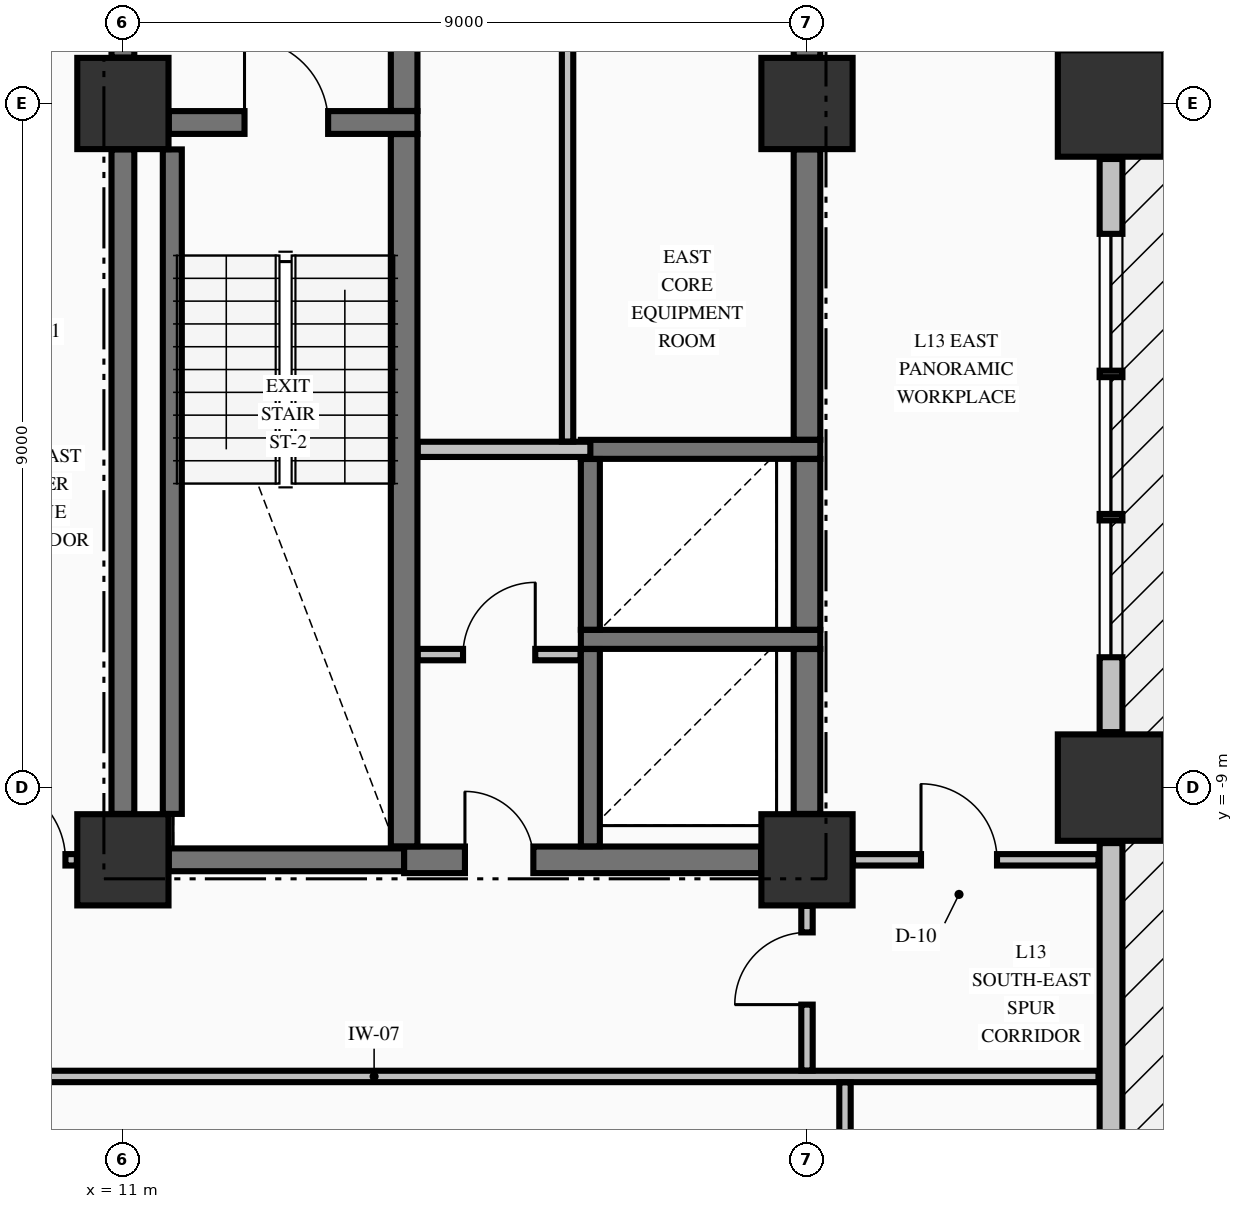
"""IFC4 building model, lengths in metres.
Left out: names, types, materials, properties, quantities, classifications, styles, units other than length and angle.
Written with IfcOpenShell. Run it as: python <this file> out.ifc"""

import sys

from ifc_helpers import new_model, si_unit, direction, frame, frame_2d, origin, origin_2d, place, context, subcontext, project, spatial, rectangle, extrude, element, fill, save


model = new_model("IFC4")
c1 = context("Model", 3, precision=1e-05, world=origin(), true_north=direction((0.0, 1.0)))
c2 = subcontext(c1, "Body", "Model", "MODEL_VIEW")
j1 = project(units=[si_unit("LENGTHUNIT", "METRE"), si_unit("PLANEANGLEUNIT", "RADIAN")], contexts=[c1])
p1 = place(None, origin())
s1 = spatial("IfcSite", under=j1, at=p1, CompositionType="ELEMENT")
p2 = place(p1, origin())
s2 = spatial("IfcBuilding", under=s1, at=p2, CompositionType="ELEMENT")
p3 = place(p2, frame((0.0, 0.0, 57.19)))
s3 = spatial("IfcBuildingStorey", under=s2, at=p3, CompositionType="ELEMENT", Elevation=57.19)
for number, where, z_axis, x_axis in (
    (1, (24.0, -9.0, -0.425), (0.0, 0.0, 1.0), (1.0, 0.0, 0.0)),
    (2, (24.0, 0.0, -0.425), (0.0, 0.0, 1.0), (1.0, 0.0, 0.0)),
):
    element("IfcColumn", number, at=place(p3, frame(where, z_axis=z_axis, x_axis=x_axis)), inside=s3, PredefinedType="COLUMN", context=c2, shape_type="SweptSolid", body=[
        extrude(rectangle(XDim=1.4, YDim=1.4, at=origin_2d()), origin(), (0.0, 0.0, 1.0), 3.695),
    ])
for number, where, z_axis, x_axis in (
    (3, (11.0, -9.95, -0.425), (0.0, 0.0, 1.0), (1.0, 0.0, 0.0)),
    (4, (11.0, 0.0, -0.425), (0.0, 0.0, 1.0), (1.0, 0.0, 0.0)),
    (5, (20.0, -9.95, -0.425), (0.0, 0.0, 1.0), (1.0, 0.0, 0.0)),
    (6, (20.0, 0.0, -0.425), (0.0, 0.0, 1.0), (1.0, 0.0, 0.0)),
):
    element("IfcColumn", number, at=place(p3, frame(where, z_axis=z_axis, x_axis=x_axis)), inside=s3, PredefinedType="COLUMN", context=c2, shape_type="SweptSolid", body=[
        extrude(rectangle(XDim=1.2, YDim=1.2, at=origin_2d()), origin(), (0.0, 0.0, 1.0), 3.695),
    ])
p4 = place(p3, frame((24.0, -22.27, 0.0), z_axis=(0.0, 0.0, 1.0), x_axis=(0.0, 1.0, 0.0)))
e7 = element("IfcWall", 7, at=p4, inside=s3, PredefinedType="STANDARD", context=c2, shape_type="SweptSolid", body=[
    extrude(rectangle(XDim=12.54, YDim=0.3, at=frame_2d((6.27, 0.0))), origin(), (0.0, 0.0, 1.0), 2.662),
])
p5 = place(p3, frame((24.0, -8.27, 0.0), z_axis=(0.0, 0.0, 1.0), x_axis=(0.0, 1.0, 0.0)))
e8 = element("IfcWall", 8, at=p5, inside=s3, PredefinedType="STANDARD", context=c2, shape_type="SweptSolid", body=[
    extrude(rectangle(XDim=7.54, YDim=0.3, at=frame_2d((3.77, 0.0))), origin(), (0.0, 0.0, 1.0), 2.662),
])
p6 = place(p5, frame((0.985, 0.0, 0.78)))
e9 = element("IfcOpeningElement", 9, at=p6, cuts=e8, PredefinedType="OPENING", context=c2, shape_type="SweptSolid", body=[
    extrude(rectangle(XDim=1.8, YDim=1.72, at=frame_2d((0.9, 0.86))), frame((0.0, 0.16, 0.0), z_axis=(0.0, -1.0, 0.0), x_axis=(1.0, 0.0, 0.0)), (0.0, 0.0, 1.0), 0.32),
])
p7 = place(p5, frame((2.87, 0.0, 0.78)))
e10 = element("IfcOpeningElement", 10, at=p7, cuts=e8, PredefinedType="OPENING", context=c2, shape_type="SweptSolid", body=[
    extrude(rectangle(XDim=1.8, YDim=1.72, at=frame_2d((0.9, 0.86))), frame((0.0, 0.16, 0.0), z_axis=(0.0, -1.0, 0.0), x_axis=(1.0, 0.0, 0.0)), (0.0, 0.0, 1.0), 0.32),
])
p8 = place(p5, frame((4.755, 0.0, 0.78)))
e11 = element("IfcOpeningElement", 11, at=p8, cuts=e8, PredefinedType="OPENING", context=c2, shape_type="SweptSolid", body=[
    extrude(rectangle(XDim=1.8, YDim=1.72, at=frame_2d((0.9, 0.86))), frame((0.0, 0.16, 0.0), z_axis=(0.0, -1.0, 0.0), x_axis=(1.0, 0.0, 0.0)), (0.0, 0.0, 1.0), 0.32),
])
p9 = place(p3, frame((11.604, -9.95, 0.0), z_axis=(0.0, 0.0, 1.0), x_axis=(1.0, 0.0, 0.0)))
e12 = element("IfcWall", 12, at=p9, inside=s3, PredefinedType="SHEAR", context=c2, shape_type="SweptSolid", body=[
    extrude(rectangle(XDim=3.096, YDim=0.3, at=frame_2d((1.548, 0.0))), origin(), (0.0, 0.0, 1.0), 3.27),
])
p10 = place(p3, frame((14.7, -9.95, 0.0), z_axis=(0.0, 0.0, 1.0), x_axis=(1.0, 0.0, 0.0)))
e13 = element("IfcWall", 13, at=p10, inside=s3, PredefinedType="SHEAR", context=c2, shape_type="SweptSolid", body=[
    extrude(rectangle(XDim=4.696, YDim=0.35, at=frame_2d((2.348, 0.0))), origin(), (0.0, 0.0, 1.0), 3.27),
])
p11 = place(p10, frame((0.8, 0.0, 0.0)))
e14 = element("IfcOpeningElement", 14, at=p11, cuts=e13, PredefinedType="OPENING", context=c2, shape_type="SweptSolid", body=[
    extrude(rectangle(XDim=0.9, YDim=2.15, at=frame_2d((0.45, 1.075))), frame((0.0, 0.185, 0.0), z_axis=(0.0, -1.0, 0.0), x_axis=(1.0, 0.0, 0.0)), (0.0, 0.0, 1.0), 0.37),
])
for number, where, z_axis, x_axis in (
    (15, (17.025, -7.05, 0.0), (0.0, 0.0, 1.0), (1.0, 0.0, 0.0)),
    (16, (17.025, -4.55, 0.0), (0.0, 0.0, 1.0), (1.0, 0.0, 0.0)),
):
    element("IfcWall", number, at=place(p3, frame(where, z_axis=z_axis, x_axis=x_axis)), inside=s3, PredefinedType="SOLIDWALL", context=c2, shape_type="SweptSolid", body=[
        extrude(rectangle(XDim=3.15, YDim=0.25, at=frame_2d((1.575, 0.0))), origin(), (0.0, 0.0, 1.0), 3.27),
    ])
p12 = place(p3, frame((11.604, -0.25, 0.0), z_axis=(0.0, 0.0, 1.0), x_axis=(1.0, 0.0, 0.0)))
e17 = element("IfcWall", 17, at=p12, inside=s3, PredefinedType="SHEAR", context=c2, shape_type="SweptSolid", body=[
    extrude(rectangle(XDim=3.271, YDim=0.3, at=frame_2d((1.635, 0.0))), origin(), (0.0, 0.0, 1.0), 3.27),
])
p13 = place(p12, frame((0.996, 0.0, 0.0)))
e18 = element("IfcOpeningElement", 18, at=p13, cuts=e17, PredefinedType="OPENING", context=c2, shape_type="SweptSolid", body=[
    extrude(rectangle(XDim=1.1, YDim=2.15, at=frame_2d((0.55, 1.075))), frame((0.0, 0.16, 0.0), z_axis=(0.0, -1.0, 0.0), x_axis=(1.0, 0.0, 0.0)), (0.0, 0.0, 1.0), 0.32),
])
p14 = place(p3, frame((-28.835, -12.8, 0.0), z_axis=(0.0, 0.0, 1.0), x_axis=(1.0, 0.0, 0.0)))
e19 = element("IfcWall", 19, at=p14, inside=s3, PredefinedType="PARTITIONING", context=c2, shape_type="SweptSolid", body=[
    extrude(rectangle(XDim=52.67, YDim=0.15, at=frame_2d((26.335, 0.0))), origin(), (0.0, 0.0, 1.0), 3.27),
])
p15 = place(p14, frame((13.81, 0.0, 0.0)))
e20 = element("IfcOpeningElement", 20, at=p15, cuts=e19, PredefinedType="OPENING", context=c2, shape_type="SweptSolid", body=[
    extrude(rectangle(XDim=1.05, YDim=2.15, at=frame_2d((0.525, 1.075))), frame((0.0, 0.085, 0.0), z_axis=(0.0, -1.0, 0.0), x_axis=(1.0, 0.0, 0.0)), (0.0, 0.0, 1.0), 0.17),
])
p16 = place(p14, frame((25.01, 0.0, 0.0)))
e21 = element("IfcOpeningElement", 21, at=p16, cuts=e19, PredefinedType="OPENING", context=c2, shape_type="SweptSolid", body=[
    extrude(rectangle(XDim=1.05, YDim=2.15, at=frame_2d((0.525, 1.075))), frame((0.0, 0.085, 0.0), z_axis=(0.0, -1.0, 0.0), x_axis=(1.0, 0.0, 0.0)), (0.0, 0.0, 1.0), 0.17),
])
p17 = place(p14, frame((32.56, 0.0, 0.0)))
e22 = element("IfcOpeningElement", 22, at=p17, cuts=e19, PredefinedType="OPENING", context=c2, shape_type="SweptSolid", body=[
    extrude(rectangle(XDim=1.05, YDim=2.15, at=frame_2d((0.525, 1.075))), frame((0.0, 0.085, 0.0), z_axis=(0.0, -1.0, 0.0), x_axis=(1.0, 0.0, 0.0)), (0.0, 0.0, 1.0), 0.17),
])
p18 = place(p3, frame((-10.394, -9.95, 0.0), z_axis=(0.0, 0.0, 1.0), x_axis=(1.0, 0.0, 0.0)))
e23 = element("IfcWall", 23, at=p18, inside=s3, PredefinedType="PARTITIONING", context=c2, shape_type="SweptSolid", body=[
    extrude(rectangle(XDim=20.788, YDim=0.15, at=frame_2d((10.394, 0.0))), origin(), (0.0, 0.0, 1.0), 3.27),
])
p19 = place(p18, frame((0.15, 0.0, 0.0)))
e24 = element("IfcOpeningElement", 24, at=p19, cuts=e23, PredefinedType="OPENING", context=c2, shape_type="SweptSolid", body=[
    extrude(rectangle(XDim=1.05, YDim=2.15, at=frame_2d((0.525, 1.075))), frame((0.0, 0.085, 0.0), z_axis=(0.0, -1.0, 0.0), x_axis=(1.0, 0.0, 0.0)), (0.0, 0.0, 1.0), 0.17),
])
p20 = place(p18, frame((19.588, 0.0, 0.0)))
e25 = element("IfcOpeningElement", 25, at=p20, cuts=e23, PredefinedType="OPENING", context=c2, shape_type="SweptSolid", body=[
    extrude(rectangle(XDim=1.05, YDim=2.15, at=frame_2d((0.525, 1.075))), frame((0.0, 0.085, 0.0), z_axis=(0.0, -1.0, 0.0), x_axis=(1.0, 0.0, 0.0)), (0.0, 0.0, 1.0), 0.17),
])
p21 = place(p18, frame((13.769, 0.0, 0.0)))
e26 = element("IfcOpeningElement", 26, at=p21, cuts=e23, PredefinedType="OPENING", context=c2, shape_type="SweptSolid", body=[
    extrude(rectangle(XDim=0.95, YDim=2.15, at=frame_2d((0.475, 1.075))), frame((0.0, 0.085, 0.0), z_axis=(0.0, -1.0, 0.0), x_axis=(1.0, 0.0, 0.0)), (0.0, 0.0, 1.0), 0.17),
])
p22 = place(p3, frame((20.606, -9.95, 0.0), z_axis=(0.0, 0.0, 1.0), x_axis=(1.0, 0.0, 0.0)))
e27 = element("IfcWall", 27, at=p22, inside=s3, PredefinedType="PARTITIONING", context=c2, shape_type="SweptSolid", body=[
    extrude(rectangle(XDim=3.229, YDim=0.15, at=frame_2d((1.615, 0.0))), origin(), (0.0, 0.0, 1.0), 3.27),
])
p23 = place(p22, frame((0.894, 0.0, 0.0)))
e28 = element("IfcOpeningElement", 28, at=p23, cuts=e27, PredefinedType="OPENING", context=c2, shape_type="SweptSolid", body=[
    extrude(rectangle(XDim=1.0, YDim=2.15, at=frame_2d((0.5, 1.075))), frame((0.0, 0.085, 0.0), z_axis=(0.0, -1.0, 0.0), x_axis=(1.0, 0.0, 0.0)), (0.0, 0.0, 1.0), 0.17),
])
p24 = place(p3, frame((14.878, -7.25, 0.0), z_axis=(0.0, 0.0, 1.0), x_axis=(1.0, 0.0, 0.0)))
e29 = element("IfcWall", 29, at=p24, inside=s3, PredefinedType="PARTITIONING", context=c2, shape_type="SweptSolid", body=[
    extrude(rectangle(XDim=2.144, YDim=0.15, at=frame_2d((1.072, 0.0))), origin(), (0.0, 0.0, 1.0), 3.27),
])
p25 = place(p24, frame((0.597, 0.0, 0.0)))
e30 = element("IfcOpeningElement", 30, at=p25, cuts=e29, PredefinedType="OPENING", context=c2, shape_type="SweptSolid", body=[
    extrude(rectangle(XDim=0.95, YDim=2.15, at=frame_2d((0.475, 1.075))), frame((0.0, 0.085, 0.0), z_axis=(0.0, -1.0, 0.0), x_axis=(1.0, 0.0, 0.0)), (0.0, 0.0, 1.0), 0.17),
])
p26 = place(p3, frame((14.878, -4.55, 0.0), z_axis=(0.0, 0.0, 1.0), x_axis=(1.0, 0.0, 0.0)))
e31 = element("IfcWall", 31, at=p26, inside=s3, PredefinedType="PARTITIONING", context=c2, shape_type="SweptSolid", body=[
    extrude(rectangle(XDim=2.272, YDim=0.2, at=frame_2d((1.136, 0.0))), origin(), (0.0, 0.0, 1.0), 3.27),
])
p27 = place(p3, frame((11.0, -9.346, 0.0), z_axis=(0.0, 0.0, 1.0), x_axis=(0.0, 1.0, 0.0)))
e32 = element("IfcWall", 32, at=p27, inside=s3, PredefinedType="SHEAR", context=c2, shape_type="SweptSolid", body=[
    extrude(rectangle(XDim=8.742, YDim=0.3, at=frame_2d((4.371, 0.0))), origin(), (0.0, 0.0, 1.0), 3.27),
])
p28 = place(p3, frame((11.0, 0.604, 0.0), z_axis=(0.0, 0.0, 1.0), x_axis=(0.0, 1.0, 0.0)))
e33 = element("IfcWall", 33, at=p28, inside=s3, PredefinedType="SHEAR", context=c2, shape_type="SweptSolid", body=[
    extrude(rectangle(XDim=2.144, YDim=0.3, at=frame_2d((1.072, 0.0))), origin(), (0.0, 0.0, 1.0), 3.27),
])
p29 = place(p28, frame((0.496, 0.0, 0.0)))
e34 = element("IfcOpeningElement", 34, at=p29, cuts=e33, PredefinedType="OPENING", context=c2, shape_type="SweptSolid", body=[
    extrude(rectangle(XDim=1.1, YDim=2.15, at=frame_2d((0.55, 1.075))), frame((0.0, 0.16, 0.0), z_axis=(0.0, -1.0, 0.0), x_axis=(1.0, 0.0, 0.0)), (0.0, 0.0, 1.0), 0.32),
])
p30 = place(p3, frame((11.65, -9.346, 0.0), z_axis=(0.0, 0.0, 1.0), x_axis=(0.0, 1.0, 0.0)))
e35 = element("IfcWall", 35, at=p30, inside=s3, PredefinedType="SOLIDWALL", context=c2, shape_type="SweptSolid", body=[
    extrude(rectangle(XDim=8.742, YDim=0.25, at=frame_2d((4.371, 0.0))), origin(), (0.0, 0.0, 1.0), 3.27),
])
p31 = place(p3, frame((14.7, -9.773, 0.0), z_axis=(0.0, 0.0, 1.0), x_axis=(0.0, 1.0, 0.0)))
e36 = element("IfcWall", 36, at=p31, inside=s3, PredefinedType="SHEAR", context=c2, shape_type="SweptSolid", body=[
    extrude(rectangle(XDim=9.371, YDim=0.35, at=frame_2d((4.686, 0.0))), origin(), (0.0, 0.0, 1.0), 3.27),
])
p32 = place(p3, frame((14.7, -0.098, 0.0), z_axis=(0.0, 0.0, 1.0), x_axis=(0.0, 1.0, 0.0)))
e37 = element("IfcWall", 37, at=p32, inside=s3, PredefinedType="SHEAR", context=c2, shape_type="SweptSolid", body=[
    extrude(rectangle(XDim=2.846, YDim=0.35, at=frame_2d((1.423, 0.0))), origin(), (0.0, 0.0, 1.0), 3.27),
])
p33 = place(p3, frame((17.15, -9.773, 0.0), z_axis=(0.0, 0.0, 1.0), x_axis=(0.0, 1.0, 0.0)))
e38 = element("IfcWall", 38, at=p33, inside=s3, PredefinedType="SOLIDWALL", context=c2, shape_type="SweptSolid", body=[
    extrude(rectangle(XDim=2.596, YDim=0.25, at=frame_2d((1.298, 0.0))), origin(), (0.0, 0.0, 1.0), 3.27),
])
p34 = place(p3, frame((17.15, -6.923, 0.0), z_axis=(0.0, 0.0, 1.0), x_axis=(0.0, 1.0, 0.0)))
e39 = element("IfcWall", 39, at=p34, inside=s3, PredefinedType="SOLIDWALL", context=c2, shape_type="SweptSolid", body=[
    extrude(rectangle(XDim=2.246, YDim=0.25, at=frame_2d((1.123, 0.0))), origin(), (0.0, 0.0, 1.0), 3.27),
])
p35 = place(p3, frame((20.0, -9.346, 0.0), z_axis=(0.0, 0.0, 1.0), x_axis=(0.0, 1.0, 0.0)))
e40 = element("IfcWall", 40, at=p35, inside=s3, PredefinedType="SHEAR", context=c2, shape_type="SweptSolid", body=[
    extrude(rectangle(XDim=2.169, YDim=0.35, at=frame_2d((1.084, 0.0))), origin(), (0.0, 0.0, 1.0), 3.27),
])
p36 = place(p3, frame((20.0, -6.923, 0.0), z_axis=(0.0, 0.0, 1.0), x_axis=(0.0, 1.0, 0.0)))
e41 = element("IfcWall", 41, at=p36, inside=s3, PredefinedType="SHEAR", context=c2, shape_type="SweptSolid", body=[
    extrude(rectangle(XDim=2.246, YDim=0.35, at=frame_2d((1.123, 0.0))), origin(), (0.0, 0.0, 1.0), 3.27),
])
p37 = place(p3, frame((20.0, -4.423, 0.0), z_axis=(0.0, 0.0, 1.0), x_axis=(0.0, 1.0, 0.0)))
e42 = element("IfcWall", 42, at=p37, inside=s3, PredefinedType="SHEAR", context=c2, shape_type="SweptSolid", body=[
    extrude(rectangle(XDim=3.819, YDim=0.35, at=frame_2d((1.91, 0.0))), origin(), (0.0, 0.0, 1.0), 3.27),
])
p38 = place(p3, frame((20.0, 0.604, 0.0), z_axis=(0.0, 0.0, 1.0), x_axis=(0.0, 1.0, 0.0)))
e43 = element("IfcWall", 43, at=p38, inside=s3, PredefinedType="SHEAR", context=c2, shape_type="SweptSolid", body=[
    extrude(rectangle(XDim=9.292, YDim=0.35, at=frame_2d((4.646, 0.0))), origin(), (0.0, 0.0, 1.0), 3.27),
])
p39 = place(p3, frame((16.85, -4.447, 0.0), z_axis=(0.0, 0.0, 1.0), x_axis=(0.0, 1.0, 0.0)))
e44 = element("IfcWall", 44, at=p39, inside=s3, PredefinedType="PARTITIONING", context=c2, shape_type="SweptSolid", body=[
    extrude(rectangle(XDim=7.369, YDim=0.15, at=frame_2d((3.685, 0.0))), origin(), (0.0, 0.0, 1.0), 3.27),
])
p40 = place(p3, frame((20.0, -12.722, 0.0), z_axis=(0.0, 0.0, 1.0), x_axis=(0.0, 1.0, 0.0)))
e45 = element("IfcWall", 45, at=p40, inside=s3, PredefinedType="PARTITIONING", context=c2, shape_type="SweptSolid", body=[
    extrude(rectangle(XDim=2.166, YDim=0.15, at=frame_2d((1.083, 0.0))), origin(), (0.0, 0.0, 1.0), 3.27),
])
p41 = place(p40, frame((0.867, 0.0, 0.0)))
e46 = element("IfcOpeningElement", 46, at=p41, cuts=e45, PredefinedType="OPENING", context=c2, shape_type="SweptSolid", body=[
    extrude(rectangle(XDim=0.95, YDim=2.15, at=frame_2d((0.475, 1.075))), frame((0.0, 0.085, 0.0), z_axis=(0.0, -1.0, 0.0), x_axis=(1.0, 0.0, 0.0)), (0.0, 0.0, 1.0), 0.17),
])
p42 = place(p3, frame((20.5, -22.294, 0.0), z_axis=(0.0, 0.0, 1.0), x_axis=(0.0, 1.0, 0.0)))
e47 = element("IfcWall", 47, at=p42, inside=s3, PredefinedType="PARTITIONING", context=c2, shape_type="SweptSolid", body=[
    extrude(rectangle(XDim=9.416, YDim=0.15, at=frame_2d((4.708, 0.0))), origin(), (0.0, 0.0, 1.0), 3.27),
])
p43 = place(p6, origin())
e48 = element("IfcWindow", 48, at=p43, inside=s3, PartitioningType="SINGLE_PANEL", PredefinedType="WINDOW", context=c2, shape_type="SweptSolid", body=[
    extrude(rectangle(XDim=1.8, YDim=1.72, at=frame_2d((0.9, 0.86))), frame((0.0, 0.03, 0.0), z_axis=(0.0, -1.0, 0.0), x_axis=(1.0, 0.0, 0.0)), (0.0, 0.0, 1.0), 0.06),
])
fill(e9, e48)
p44 = place(p7, origin())
e49 = element("IfcWindow", 49, at=p44, inside=s3, PartitioningType="SINGLE_PANEL", PredefinedType="WINDOW", context=c2, shape_type="SweptSolid", body=[
    extrude(rectangle(XDim=1.8, YDim=1.72, at=frame_2d((0.9, 0.86))), frame((0.0, 0.03, 0.0), z_axis=(0.0, -1.0, 0.0), x_axis=(1.0, 0.0, 0.0)), (0.0, 0.0, 1.0), 0.06),
])
fill(e10, e49)
p45 = place(p8, origin())
e50 = element("IfcWindow", 50, at=p45, inside=s3, PartitioningType="SINGLE_PANEL", PredefinedType="WINDOW", context=c2, shape_type="SweptSolid", body=[
    extrude(rectangle(XDim=1.8, YDim=1.72, at=frame_2d((0.9, 0.86))), frame((0.0, 0.03, 0.0), z_axis=(0.0, -1.0, 0.0), x_axis=(1.0, 0.0, 0.0)), (0.0, 0.0, 1.0), 0.06),
])
fill(e11, e50)
p46 = place(p13, origin())
e51 = element("IfcDoor", 51, at=p46, inside=s3, OperationType="SINGLE_SWING_LEFT", PredefinedType="DOOR", context=c2, shape_type="SweptSolid", body=[
    extrude(rectangle(XDim=1.1, YDim=2.15, at=frame_2d((0.55, 1.075))), frame((0.0, 0.025, 0.0), z_axis=(0.0, -1.0, 0.0), x_axis=(1.0, 0.0, 0.0)), (0.0, 0.0, 1.0), 0.05),
])
fill(e18, e51)
p47 = place(p11, origin())
e52 = element("IfcDoor", 52, at=p47, inside=s3, OperationType="SINGLE_SWING_LEFT", PredefinedType="DOOR", context=c2, shape_type="SweptSolid", body=[
    extrude(rectangle(XDim=0.9, YDim=2.15, at=frame_2d((0.45, 1.075))), frame((0.0, 0.025, 0.0), z_axis=(0.0, -1.0, 0.0), x_axis=(1.0, 0.0, 0.0)), (0.0, 0.0, 1.0), 0.05),
])
fill(e14, e52)
p48 = place(p25, origin())
e53 = element("IfcDoor", 53, at=p48, inside=s3, OperationType="SINGLE_SWING_RIGHT", PredefinedType="DOOR", context=c2, shape_type="SweptSolid", body=[
    extrude(rectangle(XDim=0.95, YDim=2.15, at=frame_2d((0.475, 1.075))), frame((0.0, 0.025, 0.0), z_axis=(0.0, -1.0, 0.0), x_axis=(1.0, 0.0, 0.0)), (0.0, 0.0, 1.0), 0.05),
])
fill(e30, e53)
p49 = place(p20, origin())
e54 = element("IfcDoor", 54, at=p49, inside=s3, OperationType="SINGLE_SWING_LEFT", PredefinedType="DOOR", context=c2, shape_type="SweptSolid", body=[
    extrude(rectangle(XDim=1.05, YDim=2.15, at=frame_2d((0.525, 1.075))), frame((0.0, 0.025, 0.0), z_axis=(0.0, -1.0, 0.0), x_axis=(1.0, 0.0, 0.0)), (0.0, 0.0, 1.0), 0.05),
])
fill(e25, e54)
p50 = place(p41, origin())
e55 = element("IfcDoor", 55, at=p50, inside=s3, OperationType="SINGLE_SWING_LEFT", PredefinedType="DOOR", context=c2, shape_type="SweptSolid", body=[
    extrude(rectangle(XDim=0.95, YDim=2.15, at=frame_2d((0.475, 1.075))), frame((0.0, 0.025, 0.0), z_axis=(0.0, -1.0, 0.0), x_axis=(1.0, 0.0, 0.0)), (0.0, 0.0, 1.0), 0.05),
])
fill(e46, e55)
p51 = place(p23, origin())
e56 = element("IfcDoor", 56, at=p51, inside=s3, OperationType="SINGLE_SWING_LEFT", PredefinedType="DOOR", context=c2, shape_type="SweptSolid", body=[
    extrude(rectangle(XDim=1.0, YDim=2.15, at=frame_2d((0.5, 1.075))), frame((0.0, 0.025, 0.0), z_axis=(0.0, -1.0, 0.0), x_axis=(1.0, 0.0, 0.0)), (0.0, 0.0, 1.0), 0.05),
])
fill(e28, e56)
save(model, sys.argv[1])
